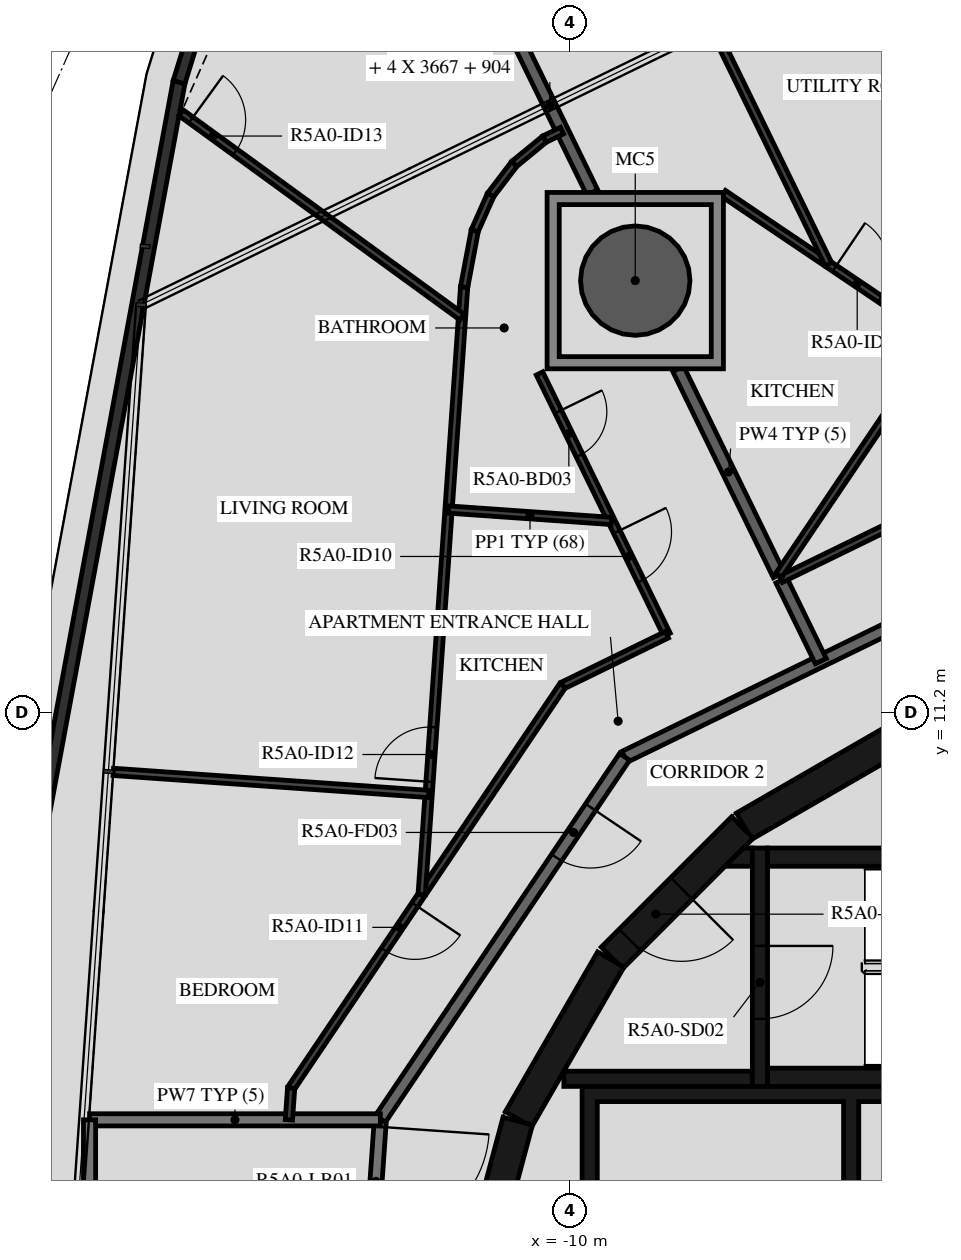
"""IFC4 building model, lengths in metres.
Left out: names, types, materials, properties, quantities, classifications, styles, units other than length and angle.
Written with IfcOpenShell. Run it as: python <this file> out.ifc"""

import sys

from ifc_helpers import new_model, si_unit, direction, frame, frame_2d, origin, origin_2d, place, context, subcontext, project, spatial, polyline, rectangle, hollow_circle, outline, extrude, element, fill, save


model = new_model("IFC4")
c1 = context("Model", 3, precision=1e-05, world=origin(), true_north=direction((0.0, 1.0)))
c2 = subcontext(c1, "Body", "Model", "MODEL_VIEW")
j1 = project(units=[si_unit("LENGTHUNIT", "METRE"), si_unit("PLANEANGLEUNIT", "RADIAN")], contexts=[c1])
p1 = place(None, origin())
s1 = spatial("IfcSite", under=j1, at=p1, CompositionType="ELEMENT")
p2 = place(p1, origin())
s2 = spatial("IfcBuilding", under=s1, at=p2, CompositionType="ELEMENT")
p3 = place(p2, frame((0.0, 0.0, 188.4)))
s3 = spatial("IfcBuildingStorey", under=s2, at=p3, CompositionType="ELEMENT", Elevation=188.4)
p4 = place(p3, frame((-8.926, 18.301, -0.45), z_axis=(0.0, 0.0, 1.0), x_axis=(1.0, 0.0, 0.0)))
e1 = element("IfcColumn", 1, at=p4, inside=s3, PredefinedType="COLUMN", context=c2, shape_type="SweptSolid", body=[
    extrude(hollow_circle(Radius=0.9, WallThickness=0.04, at=origin_2d()), origin(), (0.0, 0.0, 1.0), 3.57),
])
p5 = place(p3, frame((-23.066, -14.25, 0.03), z_axis=(0.0, 0.0, 1.0), x_axis=(0.182236609877, 0.983254706585, 0.0)))
e2 = element("IfcWall", 2, at=p5, inside=s3, PredefinedType="PARAPET", context=c2, shape_type="SweptSolid", body=[
    extrude(rectangle(XDim=36.429, YDim=0.2, at=frame_2d((18.214, 0.0))), origin(), (0.0, 0.0, 1.0), 1.5),
])
p6 = place(p3, frame((-16.429, 21.564, 0.03), z_axis=(0.0, 0.0, 1.0), x_axis=(0.295126785962, 0.955458099661, 0.0)))
e3 = element("IfcWall", 3, at=p6, inside=s3, PredefinedType="PARAPET", context=c2, shape_type="SweptSolid", body=[
    extrude(rectangle(XDim=2.258, YDim=0.2, at=frame_2d((1.129, 0.0))), origin(), (0.0, 0.0, 1.0), 1.5),
])
p7 = place(p3, frame((-4.51, 10.845, 0.0), z_axis=(0.0, 0.0, 1.0), x_axis=(-0.865975092491, -0.500087131594, 0.0)))
e4 = element("IfcWall", 4, at=p7, inside=s3, PredefinedType="SHEAR", context=c2, shape_type="SweptSolid", body=[
    extrude(rectangle(XDim=3.033, YDim=0.5, at=frame_2d((1.516, 0.0))), origin(), (0.0, 0.0, 1.0), 3.12),
])
p8 = place(p3, frame((-7.164, 9.308, 0.0), z_axis=(0.0, 0.0, 1.0), x_axis=(-0.707106781187, -0.707106781187, 0.0)))
e5 = element("IfcWall", 5, at=p8, inside=s3, PredefinedType="SHEAR", context=c2, shape_type="SweptSolid", body=[
    extrude(rectangle(XDim=3.032, YDim=0.5, at=frame_2d((1.516, 0.0))), origin(), (0.0, 0.0, 1.0), 3.12),
])
p9 = place(p8, frame((1.416, 0.0, 0.0)))
e6 = element("IfcOpeningElement", 6, at=p9, cuts=e5, PredefinedType="OPENING", context=c2, shape_type="SweptSolid", body=[
    extrude(rectangle(XDim=1.2, YDim=2.1, at=frame_2d((0.6, 1.05))), frame((0.0, 0.26, 0.0), z_axis=(0.0, -1.0, 0.0), x_axis=(1.0, 0.0, 0.0)), (0.0, 0.0, 1.0), 0.52),
])
for number, where, z_axis, x_axis in (
    (7, (-9.329, 7.137, 0.0), (0.0, 0.0, 1.0), (-0.5, -0.866, 0.0)),
    (8, (-10.858, 4.479, 0.0), (0.0, 0.0, 1.0), (-0.259, -0.966, 0.0)),
):
    element("IfcWall", number, at=place(p3, frame(where, z_axis=z_axis, x_axis=x_axis)), inside=s3, PredefinedType="SHEAR", context=c2, shape_type="SweptSolid", body=[
        extrude(rectangle(XDim=3.033, YDim=0.5, at=frame_2d((1.516, 0.0))), origin(), (0.0, 0.0, 1.0), 3.12),
    ])
for number, where, z_axis, x_axis in (
    (9, (-6.75, 5.2, 0.0), (0.0, 0.0, 1.0), (1.0, 0.0, 0.0)),
    (10, (-6.75, 8.82, 0.0), (0.0, 0.0, 1.0), (1.0, 0.0, 0.0)),
):
    element("IfcWall", number, at=place(p3, frame(where, z_axis=z_axis, x_axis=x_axis)), inside=s3, PredefinedType="SHEAR", context=c2, shape_type="SweptSolid", body=[
        extrude(rectangle(XDim=6.75, YDim=0.3, at=frame_2d((3.375, 0.0))), origin(), (0.0, 0.0, 1.0), 3.12),
    ])
p10 = place(p3, frame((-6.875, 8.97, 0.0), z_axis=(0.0, 0.0, 1.0), x_axis=(0.0, -1.0, 0.0)))
e11 = element("IfcWall", 11, at=p10, inside=s3, PredefinedType="SHEAR", context=c2, shape_type="SweptSolid", body=[
    extrude(rectangle(XDim=3.92, YDim=0.25, at=frame_2d((1.96, 0.0))), origin(), (0.0, 0.0, 1.0), 3.12),
])
p11 = place(p10, frame((1.61, 0.0, 0.0)))
e12 = element("IfcOpeningElement", 12, at=p11, cuts=e11, PredefinedType="OPENING", context=c2, shape_type="SweptSolid", body=[
    extrude(rectangle(XDim=1.2, YDim=2.1, at=frame_2d((0.6, 1.05))), frame((0.0, 0.135, 0.0), z_axis=(0.0, -1.0, 0.0), x_axis=(1.0, 0.0, 0.0)), (0.0, 0.0, 1.0), 0.27),
])
p12 = place(p3, frame((-7.0, 5.175, 0.0), z_axis=(0.0, 0.0, 1.0), x_axis=(-1.0, 0.0, 0.0)))
e13 = element("IfcWall", 13, at=p12, inside=s3, PredefinedType="SHEAR", context=c2, shape_type="SweptSolid", body=[
    extrude(rectangle(XDim=3.1, YDim=0.25, at=frame_2d((1.55, 0.0))), origin(), (0.0, 0.0, 1.0), 3.12),
])
p13 = place(p3, origin())
e14 = element("IfcWall", 14, at=p13, inside=s3, PredefinedType="SHEAR", context=c2, shape_type="SweptSolid", body=[
    extrude(outline(polyline([(-7.148, 8.97), (-7.0, 8.97), (-7.0, 8.67), (-7.448, 8.67), (-7.148, 8.97)])), origin(), (0.0, 0.0, 1.0), 3.12),
])
p14 = place(p3, origin())
e15 = element("IfcWall", 15, at=p14, inside=s3, PredefinedType="SHEAR", context=c2, shape_type="SweptSolid", body=[
    extrude(outline(polyline([(-9.55, 4.8), (-5.5, 4.8), (-5.5, 1.9), (-5.25, 1.9), (-5.25, 4.8), (-1.2, 4.8), (-1.2, 1.9), (-0.95, 1.9), (-0.95, 4.8), (0.95, 4.8), (0.95, 1.9), (1.2, 1.9), (1.2, 4.8), (3.1, 4.8), (3.1, 1.9), (3.35, 1.9), (3.35, 4.8), (5.25, 4.8), (5.25, 1.9), (5.5, 1.9), (5.5, 4.8), (7.4, 4.8), (7.4, 1.9), (7.65, 1.9), (7.65, 4.8), (9.55, 4.8), (9.55, 1.9), (9.8, 1.9), (9.8, 4.8), (9.8, 5.05), (-9.8, 5.05), (-9.8, 4.8), (-9.8, 1.9), (-9.55, 1.9), (-9.55, 4.8)])), origin(), (0.0, 0.0, 1.0), 3.12),
])
p15 = place(p3, frame((-13.118, 4.5, 0.0), z_axis=(0.0, 0.0, 1.0), x_axis=(-0.069746872611, -0.99756472159, 0.0)))
e16 = element("IfcWall", 16, at=p15, inside=s3, PredefinedType="STANDARD", context=c2, shape_type="SweptSolid", body=[
    extrude(rectangle(XDim=3.574, YDim=0.2, at=frame_2d((1.787, 0.0))), origin(), (0.0, 0.0, 1.0), 3.12),
])
p16 = place(p15, frame((0.115, 0.0, 0.0)))
e17 = element("IfcOpeningElement", 17, at=p16, cuts=e16, PredefinedType="OPENING", context=c2, shape_type="SweptSolid", body=[
    extrude(rectangle(XDim=1.8, YDim=2.1, at=frame_2d((0.9, 1.05))), frame((0.0, 0.11, 0.0), z_axis=(0.0, -1.0, 0.0), x_axis=(1.0, 0.0, 0.0)), (0.0, 0.0, 1.0), 0.22),
])
p17 = place(p3, frame((-2.647, 13.618, 0.0), z_axis=(0.0, 0.0, 1.0), x_axis=(-0.898796543751, -0.438366026218, 0.0)))
e18 = element("IfcWall", 18, at=p17, inside=s3, PredefinedType="STANDARD", context=c2, shape_type="SweptSolid", body=[
    extrude(rectangle(XDim=7.181, YDim=0.2, at=frame_2d((3.591, 0.0))), origin(), (0.0, 0.0, 1.0), 3.12),
])
p18 = place(p3, frame((-9.101, 10.47, 0.0), z_axis=(0.0, 0.0, 1.0), x_axis=(-0.559195469534, -0.829035841718, 0.0)))
e19 = element("IfcWall", 19, at=p18, inside=s3, PredefinedType="STANDARD", context=c2, shape_type="SweptSolid", body=[
    extrude(rectangle(XDim=7.181, YDim=0.2, at=frame_2d((3.591, 0.0))), origin(), (0.0, 0.0, 1.0), 3.12),
])
p19 = place(p18, frame((1.0, 0.0, 0.0)))
e20 = element("IfcOpeningElement", 20, at=p19, cuts=e19, PredefinedType="OPENING", context=c2, shape_type="SweptSolid", body=[
    extrude(rectangle(XDim=1.0, YDim=2.1, at=frame_2d((0.5, 1.05))), frame((0.0, 0.11, 0.0), z_axis=(0.0, -1.0, 0.0), x_axis=(1.0, 0.0, 0.0)), (0.0, 0.0, 1.0), 0.22),
])
p20 = place(p3, frame((-13.118, 4.5, 0.0), z_axis=(0.0, 0.0, 1.0), x_axis=(-1.0, 0.0, 0.0)))
e21 = element("IfcWall", 21, at=p20, inside=s3, PredefinedType="STANDARD", context=c2, shape_type="SweptSolid", body=[
    extrude(rectangle(XDim=4.782, YDim=0.2, at=frame_2d((2.391, 0.0))), origin(), (0.0, 0.0, 1.0), 3.12),
])
p21 = place(p3, frame((-17.9, 4.5, 0.0), z_axis=(0.0, 0.0, 1.0), x_axis=(0.0, -1.0, 0.0)))
e22 = element("IfcWall", 22, at=p21, inside=s3, PredefinedType="STANDARD", context=c2, shape_type="SweptSolid", body=[
    extrude(rectangle(XDim=9.0, YDim=0.2, at=frame_2d((4.5, 0.0))), origin(), (0.0, 0.0, 1.0), 3.12),
])
p22 = place(p3, frame((-6.522, 13.373, 0.0), z_axis=(0.0, 0.0, 1.0), x_axis=(0.438277270821, -0.8988398266, 0.0)))
e23 = element("IfcWall", 23, at=p22, inside=s3, PredefinedType="STANDARD", context=c2, shape_type="SweptSolid", body=[
    extrude(rectangle(XDim=1.479, YDim=0.2, at=frame_2d((0.74, 0.0))), origin(), (0.0, 0.0, 1.0), 3.12),
])
p23 = place(p3, frame((-8.219, 16.851, 0.0), z_axis=(0.0, 0.0, 1.0), x_axis=(0.438291091101, -0.898833087654, 0.0)))
e24 = element("IfcWall", 24, at=p23, inside=s3, PredefinedType="STANDARD", context=c2, shape_type="SweptSolid", body=[
    extrude(rectangle(XDim=3.774, YDim=0.2, at=frame_2d((1.887, 0.0))), origin(), (0.0, 0.0, 1.0), 3.12),
])
p24 = place(p3, frame((-12.409, 25.442, 0.0), z_axis=(0.0, 0.0, 1.0), x_axis=(0.43838641251, -0.898786600549, 0.0)))
e25 = element("IfcWall", 25, at=p24, inside=s3, PredefinedType="STANDARD", context=c2, shape_type="SweptSolid", body=[
    extrude(rectangle(XDim=6.333, YDim=0.2, at=frame_2d((3.166, 0.0))), origin(), (0.0, 0.0, 1.0), 3.12),
])
p25 = place(p3, frame((-2.943, 15.142, 0.0), z_axis=(0.0, 0.0, 1.0), x_axis=(-0.89881075705, -0.438336883014, 0.0)))
e26 = element("IfcWall", 26, at=p25, inside=s3, PredefinedType="PARTITIONING", context=c2, shape_type="SweptSolid", body=[
    extrude(rectangle(XDim=3.992, YDim=0.12, at=frame_2d((1.996, 0.0))), origin(), (0.0, 0.0, 1.0), 3.12),
])
p26 = place(p3, frame((-7.476, 19.735, 0.0), z_axis=(0.0, 0.0, 1.0), x_axis=(0.829035412992, -0.559196105142, 0.0)))
e27 = element("IfcWall", 27, at=p26, inside=s3, PredefinedType="PARTITIONING", context=c2, shape_type="SweptSolid", body=[
    extrude(rectangle(XDim=8.531, YDim=0.12, at=frame_2d((4.266, 0.0))), origin(), (0.0, 0.0, 1.0), 3.12),
])
p27 = place(p26, frame((2.204, 0.0, 0.0)))
e28 = element("IfcOpeningElement", 28, at=p27, cuts=e27, PredefinedType="OPENING", context=c2, shape_type="SweptSolid", body=[
    extrude(rectangle(XDim=0.9, YDim=2.1, at=frame_2d((0.45, 1.05))), frame((0.0, 0.07, 0.0), z_axis=(0.0, -1.0, 0.0), x_axis=(1.0, 0.0, 0.0)), (0.0, 0.0, 1.0), 0.14),
])
p28 = place(p3, frame((-3.939, 17.35, 0.0), z_axis=(0.0, 0.0, 1.0), x_axis=(-0.559193216274, -0.829037361566, 0.0)))
e29 = element("IfcWall", 29, at=p28, inside=s3, PredefinedType="PARTITIONING", context=c2, shape_type="SweptSolid", body=[
    extrude(rectangle(XDim=4.694, YDim=0.12, at=frame_2d((2.347, 0.0))), origin(), (0.0, 0.0, 1.0), 3.12),
])
p29 = place(p3, frame((-9.496, 26.254, 0.0), z_axis=(0.0, 0.0, 1.0), x_axis=(0.438361739807, -0.89879863433, 0.0)))
e30 = element("IfcWall", 30, at=p29, inside=s3, PredefinedType="PARTITIONING", context=c2, shape_type="SweptSolid", body=[
    extrude(rectangle(XDim=8.549, YDim=0.12, at=frame_2d((4.274, 0.0))), origin(), (0.0, 0.0, 1.0), 3.12),
])
p30 = place(p29, frame((0.4, 0.0, 0.0)))
e31 = element("IfcOpeningElement", 31, at=p30, cuts=e30, PredefinedType="OPENING", context=c2, shape_type="SweptSolid", body=[
    extrude(rectangle(XDim=0.9, YDim=2.1, at=frame_2d((0.45, 1.05))), frame((0.0, 0.07, 0.0), z_axis=(0.0, -1.0, 0.0), x_axis=(1.0, 0.0, 0.0)), (0.0, 0.0, 1.0), 0.14),
])
p31 = place(p3, frame((-10.5, 16.775, 0.0), z_axis=(0.0, 0.0, 1.0), x_axis=(0.438345136783, -0.898806731761, 0.0)))
e32 = element("IfcWall", 32, at=p31, inside=s3, PredefinedType="PARTITIONING", context=c2, shape_type="SweptSolid", body=[
    extrude(rectangle(XDim=4.78, YDim=0.12, at=frame_2d((2.39, 0.0))), origin(), (0.0, 0.0, 1.0), 3.12),
])
p32 = place(p31, frame((0.7, 0.0, 0.0)))
e33 = element("IfcOpeningElement", 33, at=p32, cuts=e32, PredefinedType="OPENING", context=c2, shape_type="SweptSolid", body=[
    extrude(rectangle(XDim=0.8, YDim=2.1, at=frame_2d((0.4, 1.05))), frame((0.0, 0.07, 0.0), z_axis=(0.0, -1.0, 0.0), x_axis=(1.0, 0.0, 0.0)), (0.0, 0.0, 1.0), 0.14),
])
p33 = place(p31, frame((2.899, 0.0, 0.0)))
e34 = element("IfcOpeningElement", 34, at=p33, cuts=e32, PredefinedType="OPENING", context=c2, shape_type="SweptSolid", body=[
    extrude(rectangle(XDim=0.9, YDim=2.1, at=frame_2d((0.45, 1.05))), frame((0.0, 0.07, 0.0), z_axis=(0.0, -1.0, 0.0), x_axis=(1.0, 0.0, 0.0)), (0.0, 0.0, 1.0), 0.14),
])
p34 = place(p3, frame((-8.405, 12.479, 0.0), z_axis=(0.0, 0.0, 1.0), x_axis=(-0.898784427692, -0.438390867307, 0.0)))
e35 = element("IfcWall", 35, at=p34, inside=s3, PredefinedType="PARTITIONING", context=c2, shape_type="SweptSolid", body=[
    extrude(rectangle(XDim=1.908, YDim=0.12, at=frame_2d((0.954, 0.0))), origin(), (0.0, 0.0, 1.0), 3.12),
])
p35 = place(p3, frame((-10.12, 11.642, 0.0), z_axis=(0.0, 0.0, 1.0), x_axis=(-0.55920080659, -0.829032241779, 0.0)))
e36 = element("IfcWall", 36, at=p35, inside=s3, PredefinedType="PARTITIONING", context=c2, shape_type="SweptSolid", body=[
    extrude(rectangle(XDim=7.985, YDim=0.12, at=frame_2d((3.992, 0.0))), origin(), (0.0, 0.0, 1.0), 3.12),
])
p36 = place(p35, frame((4.346, 0.0, 0.0)))
e37 = element("IfcOpeningElement", 37, at=p36, cuts=e36, PredefinedType="OPENING", context=c2, shape_type="SweptSolid", body=[
    extrude(rectangle(XDim=0.9, YDim=2.1, at=frame_2d((0.45, 1.05))), frame((0.0, 0.07, 0.0), z_axis=(0.0, -1.0, 0.0), x_axis=(1.0, 0.0, 0.0)), (0.0, 0.0, 1.0), 0.14),
])
p37 = place(p3, frame((-14.585, 5.022, 0.0), z_axis=(0.0, 0.0, 1.0), x_axis=(-0.069490327804, -0.997582625321, 0.0)))
e38 = element("IfcWall", 38, at=p37, inside=s3, PredefinedType="PARTITIONING", context=c2, shape_type="SweptSolid", body=[
    extrude(rectangle(XDim=0.523, YDim=0.12, at=frame_2d((0.262, 0.0))), origin(), (0.0, 0.0, 1.0), 3.12),
])
p38 = place(p3, frame((-12.439, 8.204, 0.0), z_axis=(0.0, 0.0, 1.0), x_axis=(0.069750037523, 0.997564500303, 0.0)))
e39 = element("IfcWall", 39, at=p38, inside=s3, PredefinedType="PARTITIONING", context=c2, shape_type="SweptSolid", body=[
    extrude(rectangle(XDim=10.014, YDim=0.12, at=frame_2d((5.007, 0.0))), origin(), (0.0, 0.0, 1.0), 3.12),
])
p39 = place(p38, frame((1.859, 0.0, 0.0)))
e40 = element("IfcOpeningElement", 40, at=p39, cuts=e39, PredefinedType="OPENING", context=c2, shape_type="SweptSolid", body=[
    extrude(rectangle(XDim=0.9, YDim=2.1, at=frame_2d((0.45, 1.05))), frame((0.0, 0.07, 0.0), z_axis=(0.0, -1.0, 0.0), x_axis=(1.0, 0.0, 0.0)), (0.0, 0.0, 1.0), 0.14),
])
p40 = place(p3, frame((-11.74, 18.194, 0.0), z_axis=(0.0, 0.0, 1.0), x_axis=(0.185144760846, 0.982711258474, 0.0)))
e41 = element("IfcWall", 41, at=p40, inside=s3, PredefinedType="PARTITIONING", context=c2, shape_type="SweptSolid", body=[
    extrude(rectangle(XDim=0.947, YDim=0.12, at=frame_2d((0.473, 0.0))), origin(), (0.0, 0.0, 1.0), 3.12),
])
for number, where, z_axis, x_axis in (
    (42, (-11.565, 19.125, 0.0), (0.0, 0.0, 1.0), (0.407, 0.914, 0.0)),
    (43, (-11.304, 19.711, 0.0), (0.0, 0.0, 1.0), (0.607, 0.795, 0.0)),
    (44, (-10.915, 20.221, 0.0), (0.0, 0.0, 1.0), (0.773, 0.634, 0.0)),
):
    element("IfcWall", number, at=place(p3, frame(where, z_axis=z_axis, x_axis=x_axis)), inside=s3, PredefinedType="PARTITIONING", context=c2, shape_type="SweptSolid", body=[
        extrude(rectangle(XDim=0.642, YDim=0.12, at=frame_2d((0.321, 0.0))), origin(), (0.0, 0.0, 1.0), 3.12),
    ])
p41 = place(p3, frame((-10.418, 20.628, 0.0), z_axis=(0.0, 0.0, 1.0), x_axis=(0.898943795765, 0.438063981692, 0.0)))
e45 = element("IfcWall", 45, at=p41, inside=s3, PredefinedType="PARTITIONING", context=c2, shape_type="SweptSolid", body=[
    extrude(rectangle(XDim=0.321, YDim=0.12, at=frame_2d((0.161, 0.0))), origin(), (0.0, 0.0, 1.0), 3.12),
])
p42 = place(p3, frame((-16.395, 21.061, 0.0), z_axis=(0.0, 0.0, 1.0), x_axis=(0.808810002497, -0.58807004673, 0.0)))
e46 = element("IfcWall", 46, at=p42, inside=s3, PredefinedType="PARTITIONING", context=c2, shape_type="SweptSolid", body=[
    extrude(rectangle(XDim=5.713, YDim=0.12, at=frame_2d((2.856, 0.0))), origin(), (0.0, 0.0, 1.0), 3.12),
])
p43 = place(p42, frame((0.2, 0.0, 0.0)))
e47 = element("IfcOpeningElement", 47, at=p43, cuts=e46, PredefinedType="OPENING", context=c2, shape_type="SweptSolid", body=[
    extrude(rectangle(XDim=0.9, YDim=2.1, at=frame_2d((0.45, 1.05))), frame((0.0, 0.07, 0.0), z_axis=(0.0, -1.0, 0.0), x_axis=(1.0, 0.0, 0.0)), (0.0, 0.0, 1.0), 0.14),
])
p44 = place(p3, frame((-11.996, 14.536, 0.0), z_axis=(0.0, 0.0, 1.0), x_axis=(0.997565991425, -0.069728708231, 0.0)))
e48 = element("IfcWall", 48, at=p44, inside=s3, PredefinedType="PARTITIONING", context=c2, shape_type="SweptSolid", body=[
    extrude(rectangle(XDim=2.686, YDim=0.12, at=frame_2d((1.343, 0.0))), origin(), (0.0, 0.0, 1.0), 3.12),
])
p45 = place(p3, frame((-17.51, 10.222, 0.0), z_axis=(0.0, 0.0, 1.0), x_axis=(0.997563184303, -0.069768856397, 0.0)))
e49 = element("IfcWall", 49, at=p45, inside=s3, PredefinedType="PARTITIONING", context=c2, shape_type="SweptSolid", body=[
    extrude(rectangle(XDim=5.2, YDim=0.12, at=frame_2d((2.6, 0.0))), origin(), (0.0, 0.0, 1.0), 2.73),
])
p46 = place(p3, origin())
e50 = element("IfcWall", 50, at=p46, inside=s3, PredefinedType="STANDARD", context=c2, shape_type="SweptSolid", body=[
    extrude(outline(polyline([(-7.476, 19.751), (-7.476, 16.851), (-10.376, 16.851), (-10.376, 19.751), (-7.476, 19.751)]), holes=[polyline([(-10.176, 17.051), (-7.676, 17.051), (-7.676, 19.551), (-10.176, 19.551), (-10.176, 17.051)])]), origin(), (0.0, 0.0, 1.0), 3.12),
])
p47 = place(p11, origin())
e51 = element("IfcDoor", 51, at=p47, inside=s3, OperationType="SINGLE_SWING_LEFT", PredefinedType="DOOR", context=c2, shape_type="SweptSolid", body=[
    extrude(rectangle(XDim=1.2, YDim=2.1, at=frame_2d((0.6, 1.05))), frame((0.0, 0.025, 0.0), z_axis=(0.0, -1.0, 0.0), x_axis=(1.0, 0.0, 0.0)), (0.0, 0.0, 1.0), 0.05),
])
fill(e12, e51)
p48 = place(p9, origin())
e52 = element("IfcDoor", 52, at=p48, inside=s3, OperationType="SINGLE_SWING_RIGHT", PredefinedType="DOOR", context=c2, shape_type="SweptSolid", body=[
    extrude(rectangle(XDim=1.2, YDim=2.1, at=frame_2d((0.6, 1.05))), frame((0.0, 0.025, 0.0), z_axis=(0.0, -1.0, 0.0), x_axis=(1.0, 0.0, 0.0)), (0.0, 0.0, 1.0), 0.05),
])
fill(e6, e52)
p49 = place(p27, origin())
e53 = element("IfcDoor", 53, at=p49, inside=s3, OperationType="SINGLE_SWING_LEFT", PredefinedType="DOOR", context=c2, shape_type="SweptSolid", body=[
    extrude(rectangle(XDim=0.9, YDim=2.1, at=frame_2d((0.45, 1.05))), frame((0.0, 0.025, 0.0), z_axis=(0.0, -1.0, 0.0), x_axis=(1.0, 0.0, 0.0)), (0.0, 0.0, 1.0), 0.05),
])
fill(e28, e53)
p50 = place(p19, origin())
e54 = element("IfcDoor", 54, at=p50, inside=s3, OperationType="SINGLE_SWING_LEFT", PredefinedType="DOOR", context=c2, shape_type="SweptSolid", body=[
    extrude(rectangle(XDim=1.0, YDim=2.1, at=frame_2d((0.5, 1.05))), frame((0.0, 0.025, 0.0), z_axis=(0.0, -1.0, 0.0), x_axis=(1.0, 0.0, 0.0)), (0.0, 0.0, 1.0), 0.05),
])
fill(e20, e54)
p51 = place(p32, origin())
e55 = element("IfcDoor", 55, at=p51, inside=s3, OperationType="SINGLE_SWING_LEFT", PredefinedType="DOOR", context=c2, shape_type="SweptSolid", body=[
    extrude(rectangle(XDim=0.8, YDim=2.1, at=frame_2d((0.4, 1.05))), frame((0.0, 0.025, 0.0), z_axis=(0.0, -1.0, 0.0), x_axis=(1.0, 0.0, 0.0)), (0.0, 0.0, 1.0), 0.05),
])
fill(e33, e55)
p52 = place(p33, origin())
e56 = element("IfcDoor", 56, at=p52, inside=s3, OperationType="SINGLE_SWING_LEFT", PredefinedType="DOOR", context=c2, shape_type="SweptSolid", body=[
    extrude(rectangle(XDim=0.9, YDim=2.1, at=frame_2d((0.45, 1.05))), frame((0.0, 0.025, 0.0), z_axis=(0.0, -1.0, 0.0), x_axis=(1.0, 0.0, 0.0)), (0.0, 0.0, 1.0), 0.05),
])
fill(e34, e56)
p53 = place(p36, origin())
e57 = element("IfcDoor", 57, at=p53, inside=s3, OperationType="SINGLE_SWING_LEFT", PredefinedType="DOOR", context=c2, shape_type="SweptSolid", body=[
    extrude(rectangle(XDim=0.9, YDim=2.1, at=frame_2d((0.45, 1.05))), frame((0.0, 0.025, 0.0), z_axis=(0.0, -1.0, 0.0), x_axis=(1.0, 0.0, 0.0)), (0.0, 0.0, 1.0), 0.05),
])
fill(e37, e57)
p54 = place(p39, origin())
e58 = element("IfcDoor", 58, at=p54, inside=s3, OperationType="SINGLE_SWING_LEFT", PredefinedType="DOOR", context=c2, shape_type="SweptSolid", body=[
    extrude(rectangle(XDim=0.9, YDim=2.1, at=frame_2d((0.45, 1.05))), frame((0.0, 0.025, 0.0), z_axis=(0.0, -1.0, 0.0), x_axis=(1.0, 0.0, 0.0)), (0.0, 0.0, 1.0), 0.05),
])
fill(e40, e58)
p55 = place(p43, origin())
e59 = element("IfcDoor", 59, at=p55, inside=s3, OperationType="SINGLE_SWING_LEFT", PredefinedType="DOOR", context=c2, shape_type="SweptSolid", body=[
    extrude(rectangle(XDim=0.9, YDim=2.1, at=frame_2d((0.45, 1.05))), frame((0.0, 0.025, 0.0), z_axis=(0.0, -1.0, 0.0), x_axis=(1.0, 0.0, 0.0)), (0.0, 0.0, 1.0), 0.05),
])
fill(e47, e59)
p56 = place(p16, origin())
e60 = element("IfcDoor", 60, at=p56, inside=s3, OperationType="DOUBLE_DOOR_SINGLE_SWING", PredefinedType="DOOR", context=c2, shape_type="SweptSolid", body=[
    extrude(rectangle(XDim=1.8, YDim=2.1, at=frame_2d((0.9, 1.05))), frame((0.0, 0.025, 0.0), z_axis=(0.0, -1.0, 0.0), x_axis=(1.0, 0.0, 0.0)), (0.0, 0.0, 1.0), 0.05),
])
fill(e17, e60)
save(model, sys.argv[1])
